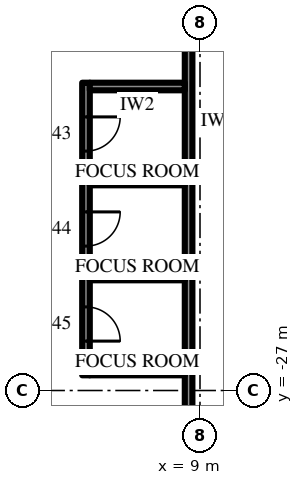
"""IFC4 building model, lengths in metres.
Left out: names, types, materials, properties, quantities, classifications, styles, units other than length and angle.
Written with IfcOpenShell. Run it as: python <this file> out.ifc"""

import sys

from ifc_helpers import new_model, si_unit, direction, frame, frame_2d, origin, place, context, subcontext, project, spatial, rectangle, extrude, element, fill, save


model = new_model("IFC4")
c1 = context("Model", 3, precision=1e-05, world=origin(), true_north=direction((0.0, 1.0)))
c2 = subcontext(c1, "Body", "Model", "MODEL_VIEW")
j1 = project(units=[si_unit("LENGTHUNIT", "METRE"), si_unit("PLANEANGLEUNIT", "RADIAN")], contexts=[c1])
p1 = place(None, origin())
s1 = spatial("IfcSite", under=j1, at=p1, CompositionType="ELEMENT")
p2 = place(p1, origin())
s2 = spatial("IfcBuilding", under=s1, at=p2, CompositionType="ELEMENT")
p3 = place(p2, frame((0.0, 0.0, 144.7)))
s3 = spatial("IfcBuildingStorey", under=s2, at=p3, CompositionType="ELEMENT", Elevation=144.7)
p4 = place(p3, frame((8.7, -12.3, 0.0), z_axis=(0.0, 0.0, 1.0), x_axis=(0.0, -1.0, 0.0)))
e1 = element("IfcWall", 1, at=p4, inside=s3, PredefinedType="PARTITIONING", context=c2, shape_type="SweptSolid", body=[
    extrude(rectangle(XDim=19.0, YDim=0.2, at=frame_2d((9.5, 0.0))), origin(), (0.0, 0.0, 1.0), 4.0),
])
p5 = place(p4, frame((1.4, 0.0, 0.0)))
e2 = element("IfcOpeningElement", 2, at=p5, cuts=e1, PredefinedType="OPENING", context=c2, shape_type="SweptSolid", body=[
    extrude(rectangle(XDim=1.0, YDim=2.2, at=frame_2d((0.5, 1.1))), frame((0.0, 0.11, 0.0), z_axis=(0.0, -1.0, 0.0), x_axis=(1.0, 0.0, 0.0)), (0.0, 0.0, 1.0), 0.22),
])
p6 = place(p3, frame((6.0, -18.9, 0.0), z_axis=(0.0, 0.0, 1.0), x_axis=(0.0, -1.0, 0.0)))
e3 = element("IfcWall", 3, at=p6, inside=s3, PredefinedType="PARTITIONING", context=c2, shape_type="SweptSolid", body=[
    extrude(rectangle(XDim=7.7, YDim=0.2, at=frame_2d((3.85, 0.0))), origin(), (0.0, 0.0, 1.0), 4.0),
])
p7 = place(p6, frame((0.9, 0.0, 0.0)))
e4 = element("IfcOpeningElement", 4, at=p7, cuts=e3, PredefinedType="OPENING", context=c2, shape_type="SweptSolid", body=[
    extrude(rectangle(XDim=0.9, YDim=2.2, at=frame_2d((0.45, 1.1))), frame((0.0, 0.11, 0.0), z_axis=(0.0, -1.0, 0.0), x_axis=(1.0, 0.0, 0.0)), (0.0, 0.0, 1.0), 0.22),
])
p8 = place(p6, frame((3.4, 0.0, 0.0)))
e5 = element("IfcOpeningElement", 5, at=p8, cuts=e3, PredefinedType="OPENING", context=c2, shape_type="SweptSolid", body=[
    extrude(rectangle(XDim=0.9, YDim=2.2, at=frame_2d((0.45, 1.1))), frame((0.0, 0.11, 0.0), z_axis=(0.0, -1.0, 0.0), x_axis=(1.0, 0.0, 0.0)), (0.0, 0.0, 1.0), 0.22),
])
p9 = place(p6, frame((5.9, 0.0, 0.0)))
e6 = element("IfcOpeningElement", 6, at=p9, cuts=e3, PredefinedType="OPENING", context=c2, shape_type="SweptSolid", body=[
    extrude(rectangle(XDim=0.9, YDim=2.2, at=frame_2d((0.45, 1.1))), frame((0.0, 0.11, 0.0), z_axis=(0.0, -1.0, 0.0), x_axis=(1.0, 0.0, 0.0)), (0.0, 0.0, 1.0), 0.22),
])
for number, where, z_axis, x_axis in (
    (7, (8.6, -19.0, 0.0), (0.0, 0.0, 1.0), (-1.0, 0.0, 0.0)),
    (8, (8.6, -21.5, 0.0), (0.0, 0.0, 1.0), (-1.0, 0.0, 0.0)),
    (9, (8.6, -24.0, 0.0), (0.0, 0.0, 1.0), (-1.0, 0.0, 0.0)),
    (10, (8.6, -26.5, 0.0), (0.0, 0.0, 1.0), (-1.0, 0.0, 0.0)),
):
    element("IfcWall", number, at=place(p3, frame(where, z_axis=z_axis, x_axis=x_axis)), inside=s3, PredefinedType="PARTITIONING", context=c2, shape_type="SweptSolid", body=[
        extrude(rectangle(XDim=2.5, YDim=0.2, at=frame_2d((1.25, 0.0))), origin(), (0.0, 0.0, 1.0), 4.0),
    ])
p10 = place(p7, origin())
e11 = element("IfcDoor", 11, at=p10, inside=s3, OperationType="SINGLE_SWING_RIGHT", PredefinedType="DOOR", context=c2, shape_type="SweptSolid", body=[
    extrude(rectangle(XDim=0.9, YDim=2.2, at=frame_2d((0.45, 1.1))), frame((0.0, 0.025, 0.0), z_axis=(0.0, -1.0, 0.0), x_axis=(1.0, 0.0, 0.0)), (0.0, 0.0, 1.0), 0.05),
])
fill(e4, e11)
p11 = place(p8, origin())
e12 = element("IfcDoor", 12, at=p11, inside=s3, OperationType="SINGLE_SWING_RIGHT", PredefinedType="DOOR", context=c2, shape_type="SweptSolid", body=[
    extrude(rectangle(XDim=0.9, YDim=2.2, at=frame_2d((0.45, 1.1))), frame((0.0, 0.025, 0.0), z_axis=(0.0, -1.0, 0.0), x_axis=(1.0, 0.0, 0.0)), (0.0, 0.0, 1.0), 0.05),
])
fill(e5, e12)
p12 = place(p9, origin())
e13 = element("IfcDoor", 13, at=p12, inside=s3, OperationType="SINGLE_SWING_LEFT", PredefinedType="DOOR", context=c2, shape_type="SweptSolid", body=[
    extrude(rectangle(XDim=0.9, YDim=2.2, at=frame_2d((0.45, 1.1))), frame((0.0, 0.025, 0.0), z_axis=(0.0, -1.0, 0.0), x_axis=(1.0, 0.0, 0.0)), (0.0, 0.0, 1.0), 0.05),
])
fill(e6, e13)
save(model, sys.argv[1])
